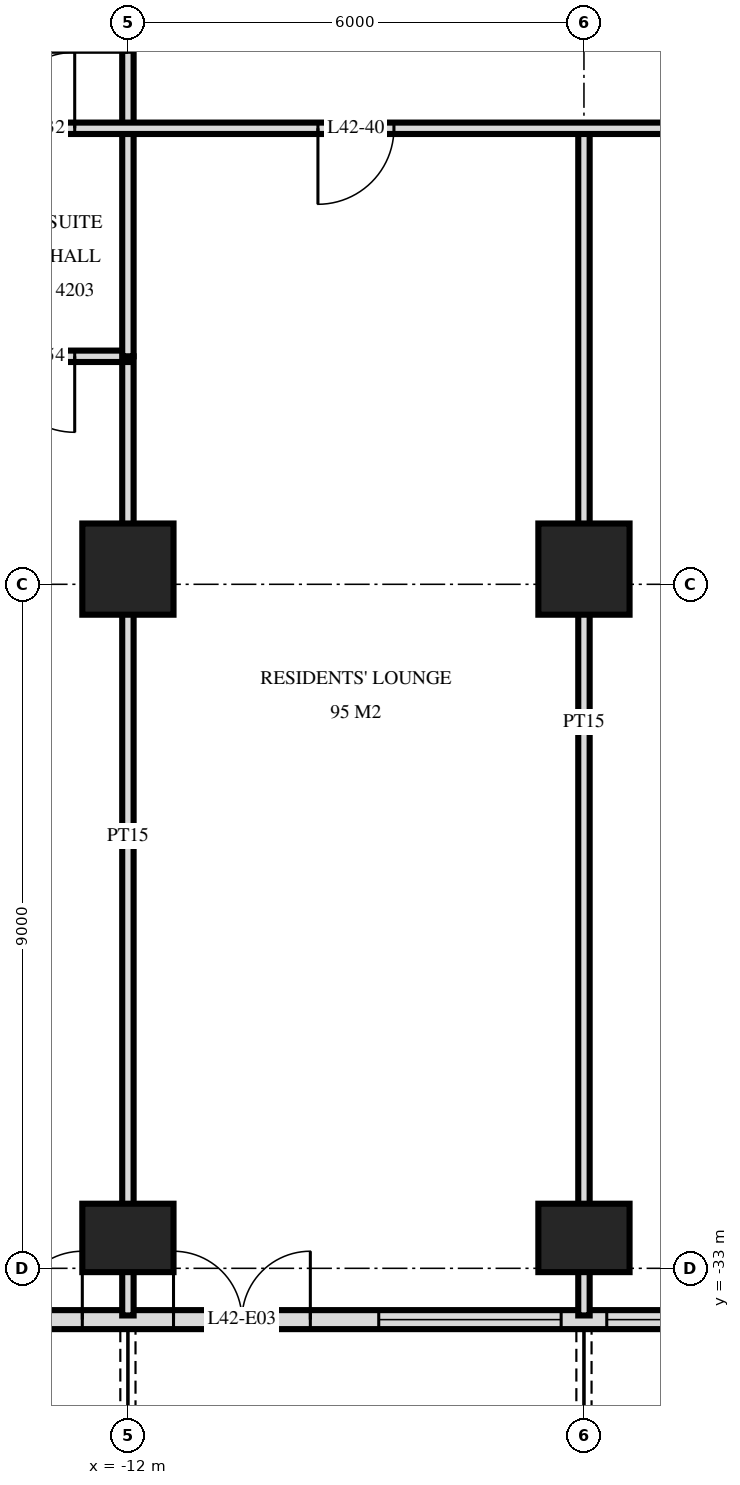
"""IFC4 building model, lengths in metres.
Left out: names, types, materials, properties, quantities, classifications, styles, units other than length and angle.
Written with IfcOpenShell. Run it as: python <this file> out.ifc"""

import sys

from ifc_helpers import new_model, si_unit, direction, frame, frame_2d, origin, origin_2d, place, context, subcontext, project, spatial, rectangle, extrude, element, fill, save


model = new_model("IFC4")
c1 = context("Model", 3, precision=1e-05, world=origin(), true_north=direction((0.0, 1.0)))
c2 = subcontext(c1, "Body", "Model", "MODEL_VIEW")
j1 = project(units=[si_unit("LENGTHUNIT", "METRE"), si_unit("PLANEANGLEUNIT", "RADIAN")], contexts=[c1])
p1 = place(None, origin())
s1 = spatial("IfcSite", under=j1, at=p1, CompositionType="ELEMENT")
p2 = place(p1, origin())
s2 = spatial("IfcBuilding", under=s1, at=p2, CompositionType="ELEMENT")
p3 = place(p2, frame((0.0, 0.0, 163.2)))
s3 = spatial("IfcBuildingStorey", under=s2, at=p3, CompositionType="ELEMENT", Elevation=163.2)
p4 = place(p3, frame((-12.0, -32.6, 0.0), z_axis=(0.0, 0.0, 1.0), x_axis=(1.0, 0.0, 0.0)))
e1 = element("IfcColumn", 1, at=p4, inside=s3, PredefinedType="COLUMN", context=c2, shape_type="SweptSolid", body=[
    extrude(rectangle(XDim=1.2, YDim=0.9, at=origin_2d()), origin(), (0.0, 0.0, 1.0), 3.6),
])
p5 = place(p3, frame((-12.0, -23.8, 0.0), z_axis=(0.0, 0.0, 1.0), x_axis=(1.0, 0.0, 0.0)))
e2 = element("IfcColumn", 2, at=p5, inside=s3, PredefinedType="COLUMN", context=c2, shape_type="SweptSolid", body=[
    extrude(rectangle(XDim=1.2, YDim=1.2, at=origin_2d()), origin(), (0.0, 0.0, 1.0), 3.6),
])
p6 = place(p3, frame((-6.0, -32.6, 0.0), z_axis=(0.0, 0.0, 1.0), x_axis=(1.0, 0.0, 0.0)))
e3 = element("IfcColumn", 3, at=p6, inside=s3, PredefinedType="COLUMN", context=c2, shape_type="SweptSolid", body=[
    extrude(rectangle(XDim=1.2, YDim=0.9, at=origin_2d()), origin(), (0.0, 0.0, 1.0), 3.6),
])
p7 = place(p3, frame((-6.0, -23.8, 0.0), z_axis=(0.0, 0.0, 1.0), x_axis=(1.0, 0.0, 0.0)))
e4 = element("IfcColumn", 4, at=p7, inside=s3, PredefinedType="COLUMN", context=c2, shape_type="SweptSolid", body=[
    extrude(rectangle(XDim=1.2, YDim=1.2, at=origin_2d()), origin(), (0.0, 0.0, 1.0), 3.6),
])
p8 = place(p3, frame((-23.675, -33.675, 0.0), z_axis=(0.0, 0.0, 1.0), x_axis=(1.0, 0.0, 0.0)))
e5 = element("IfcWall", 5, at=p8, inside=s3, PredefinedType="SOLIDWALL", context=c2, shape_type="SweptSolid", body=[
    extrude(rectangle(XDim=47.351, YDim=0.25, at=frame_2d((23.675, 0.0))), origin(), (0.0, 0.0, 1.0), 3.32),
])
p9 = place(p8, frame((0.575, 0.0, 0.0)))
e6 = element("IfcOpeningElement", 6, at=p9, cuts=e5, PredefinedType="OPENING", context=c2, shape_type="SweptSolid", body=[
    extrude(rectangle(XDim=1.8, YDim=2.4, at=frame_2d((0.9, 1.2))), frame((0.0, 0.135, 0.0), z_axis=(0.0, -1.0, 0.0), x_axis=(1.0, 0.0, 0.0)), (0.0, 0.0, 1.0), 0.27),
])
p10 = place(p8, frame((3.425, 0.0, 0.3)))
e7 = element("IfcOpeningElement", 7, at=p10, cuts=e5, PredefinedType="OPENING", context=c2, shape_type="SweptSolid", body=[
    extrude(rectangle(XDim=1.8, YDim=2.1, at=frame_2d((0.9, 1.05))), frame((0.0, 0.135, 0.0), z_axis=(0.0, -1.0, 0.0), x_axis=(1.0, 0.0, 0.0)), (0.0, 0.0, 1.0), 0.27),
])
p11 = place(p8, frame((5.975, 0.0, 0.3)))
e8 = element("IfcOpeningElement", 8, at=p11, cuts=e5, PredefinedType="OPENING", context=c2, shape_type="SweptSolid", body=[
    extrude(rectangle(XDim=2.4, YDim=2.1, at=frame_2d((1.2, 1.05))), frame((0.0, 0.135, 0.0), z_axis=(0.0, -1.0, 0.0), x_axis=(1.0, 0.0, 0.0)), (0.0, 0.0, 1.0), 0.27),
])
p12 = place(p8, frame((9.275, 0.0, 0.0)))
e9 = element("IfcOpeningElement", 9, at=p12, cuts=e5, PredefinedType="OPENING", context=c2, shape_type="SweptSolid", body=[
    extrude(rectangle(XDim=1.8, YDim=2.4, at=frame_2d((0.9, 1.2))), frame((0.0, 0.135, 0.0), z_axis=(0.0, -1.0, 0.0), x_axis=(1.0, 0.0, 0.0)), (0.0, 0.0, 1.0), 0.27),
])
p13 = place(p8, frame((12.275, 0.0, 0.0)))
e10 = element("IfcOpeningElement", 10, at=p13, cuts=e5, PredefinedType="OPENING", context=c2, shape_type="SweptSolid", body=[
    extrude(rectangle(XDim=1.8, YDim=2.4, at=frame_2d((0.9, 1.2))), frame((0.0, 0.135, 0.0), z_axis=(0.0, -1.0, 0.0), x_axis=(1.0, 0.0, 0.0)), (0.0, 0.0, 1.0), 0.27),
])
p14 = place(p8, frame((14.975, 0.0, 0.3)))
e11 = element("IfcOpeningElement", 11, at=p14, cuts=e5, PredefinedType="OPENING", context=c2, shape_type="SweptSolid", body=[
    extrude(rectangle(XDim=2.4, YDim=2.1, at=frame_2d((1.2, 1.05))), frame((0.0, 0.135, 0.0), z_axis=(0.0, -1.0, 0.0), x_axis=(1.0, 0.0, 0.0)), (0.0, 0.0, 1.0), 0.27),
])
p15 = place(p8, frame((17.975, 0.0, 0.3)))
e12 = element("IfcOpeningElement", 12, at=p15, cuts=e5, PredefinedType="OPENING", context=c2, shape_type="SweptSolid", body=[
    extrude(rectangle(XDim=2.4, YDim=2.1, at=frame_2d((1.2, 1.05))), frame((0.0, 0.135, 0.0), z_axis=(0.0, -1.0, 0.0), x_axis=(1.0, 0.0, 0.0)), (0.0, 0.0, 1.0), 0.27),
])
p16 = place(p8, frame((21.275, 0.0, 0.0)))
e13 = element("IfcOpeningElement", 13, at=p16, cuts=e5, PredefinedType="OPENING", context=c2, shape_type="SweptSolid", body=[
    extrude(rectangle(XDim=1.8, YDim=2.4, at=frame_2d((0.9, 1.2))), frame((0.0, 0.135, 0.0), z_axis=(0.0, -1.0, 0.0), x_axis=(1.0, 0.0, 0.0)), (0.0, 0.0, 1.0), 0.27),
])
p17 = place(p8, frame((24.275, 0.0, 0.0)))
e14 = element("IfcOpeningElement", 14, at=p17, cuts=e5, PredefinedType="OPENING", context=c2, shape_type="SweptSolid", body=[
    extrude(rectangle(XDim=1.8, YDim=2.4, at=frame_2d((0.9, 1.2))), frame((0.0, 0.135, 0.0), z_axis=(0.0, -1.0, 0.0), x_axis=(1.0, 0.0, 0.0)), (0.0, 0.0, 1.0), 0.27),
])
p18 = place(p8, frame((26.975, 0.0, 0.3)))
e15 = element("IfcOpeningElement", 15, at=p18, cuts=e5, PredefinedType="OPENING", context=c2, shape_type="SweptSolid", body=[
    extrude(rectangle(XDim=2.4, YDim=2.1, at=frame_2d((1.2, 1.05))), frame((0.0, 0.135, 0.0), z_axis=(0.0, -1.0, 0.0), x_axis=(1.0, 0.0, 0.0)), (0.0, 0.0, 1.0), 0.27),
])
p19 = place(p8, frame((30.275, 0.0, 0.0)))
e16 = element("IfcOpeningElement", 16, at=p19, cuts=e5, PredefinedType="OPENING", context=c2, shape_type="SweptSolid", body=[
    extrude(rectangle(XDim=1.8, YDim=2.4, at=frame_2d((0.9, 1.2))), frame((0.0, 0.135, 0.0), z_axis=(0.0, -1.0, 0.0), x_axis=(1.0, 0.0, 0.0)), (0.0, 0.0, 1.0), 0.27),
])
p20 = place(p8, frame((32.975, 0.0, 0.3)))
e17 = element("IfcOpeningElement", 17, at=p20, cuts=e5, PredefinedType="OPENING", context=c2, shape_type="SweptSolid", body=[
    extrude(rectangle(XDim=2.4, YDim=2.1, at=frame_2d((1.2, 1.05))), frame((0.0, 0.135, 0.0), z_axis=(0.0, -1.0, 0.0), x_axis=(1.0, 0.0, 0.0)), (0.0, 0.0, 1.0), 0.27),
])
p21 = place(p8, frame((36.275, 0.0, 0.0)))
e18 = element("IfcOpeningElement", 18, at=p21, cuts=e5, PredefinedType="OPENING", context=c2, shape_type="SweptSolid", body=[
    extrude(rectangle(XDim=1.8, YDim=2.4, at=frame_2d((0.9, 1.2))), frame((0.0, 0.135, 0.0), z_axis=(0.0, -1.0, 0.0), x_axis=(1.0, 0.0, 0.0)), (0.0, 0.0, 1.0), 0.27),
])
p22 = place(p8, frame((38.975, 0.0, 0.3)))
e19 = element("IfcOpeningElement", 19, at=p22, cuts=e5, PredefinedType="OPENING", context=c2, shape_type="SweptSolid", body=[
    extrude(rectangle(XDim=2.4, YDim=2.1, at=frame_2d((1.2, 1.05))), frame((0.0, 0.135, 0.0), z_axis=(0.0, -1.0, 0.0), x_axis=(1.0, 0.0, 0.0)), (0.0, 0.0, 1.0), 0.27),
])
p23 = place(p8, frame((41.975, 0.0, 0.3)))
e20 = element("IfcOpeningElement", 20, at=p23, cuts=e5, PredefinedType="OPENING", context=c2, shape_type="SweptSolid", body=[
    extrude(rectangle(XDim=2.4, YDim=2.1, at=frame_2d((1.2, 1.05))), frame((0.0, 0.135, 0.0), z_axis=(0.0, -1.0, 0.0), x_axis=(1.0, 0.0, 0.0)), (0.0, 0.0, 1.0), 0.27),
])
p24 = place(p8, frame((45.125, 0.0, 0.0)))
e21 = element("IfcOpeningElement", 21, at=p24, cuts=e5, PredefinedType="OPENING", context=c2, shape_type="SweptSolid", body=[
    extrude(rectangle(XDim=1.8, YDim=2.4, at=frame_2d((0.9, 1.2))), frame((0.0, 0.135, 0.0), z_axis=(0.0, -1.0, 0.0), x_axis=(1.0, 0.0, 0.0)), (0.0, 0.0, 1.0), 0.27),
])
p25 = place(p3, frame((-6.0, -33.62, 0.0), z_axis=(0.0, 0.0, 1.0), x_axis=(0.0, 1.0, 0.0)))
e22 = element("IfcWall", 22, at=p25, inside=s3, PredefinedType="PARTITIONING", context=c2, shape_type="SweptSolid", body=[
    extrude(rectangle(XDim=15.62, YDim=0.15, at=frame_2d((7.81, 0.0))), origin(), (0.0, 0.0, 1.0), 3.32),
])
p26 = place(p3, frame((-12.0, -21.0, 0.0), z_axis=(0.0, 0.0, 1.0), x_axis=(0.0, 1.0, 0.0)))
e23 = element("IfcWall", 23, at=p26, inside=s3, PredefinedType="PARTITIONING", context=c2, shape_type="SweptSolid", body=[
    extrude(rectangle(XDim=5.95, YDim=0.15, at=frame_2d((2.975, 0.0))), origin(), (0.0, 0.0, 1.0), 3.32),
])
p27 = place(p26, frame((4.0, 0.0, 0.0)))
e24 = element("IfcOpeningElement", 24, at=p27, cuts=e23, PredefinedType="OPENING", context=c2, shape_type="SweptSolid", body=[
    extrude(rectangle(XDim=1.0, YDim=2.1, at=frame_2d((0.5, 1.05))), frame((0.0, 0.085, 0.0), z_axis=(0.0, -1.0, 0.0), x_axis=(1.0, 0.0, 0.0)), (0.0, 0.0, 1.0), 0.17),
])
p28 = place(p3, frame((-12.0, -33.62, 0.0), z_axis=(0.0, 0.0, 1.0), x_axis=(0.0, 1.0, 0.0)))
e25 = element("IfcWall", 25, at=p28, inside=s3, PredefinedType="PARTITIONING", context=c2, shape_type="SweptSolid", body=[
    extrude(rectangle(XDim=12.62, YDim=0.15, at=frame_2d((6.31, 0.0))), origin(), (0.0, 0.0, 1.0), 3.32),
])
p29 = place(p3, frame((-14.4, -21.0, 0.0), z_axis=(0.0, 0.0, 1.0), x_axis=(1.0, 0.0, 0.0)))
e26 = element("IfcWall", 26, at=p29, inside=s3, PredefinedType="PARTITIONING", context=c2, shape_type="SweptSolid", body=[
    extrude(rectangle(XDim=2.4, YDim=0.15, at=frame_2d((1.2, 0.0))), origin(), (0.0, 0.0, 1.0), 3.32),
])
p30 = place(p29, frame((0.7, 0.0, 0.0)))
e27 = element("IfcOpeningElement", 27, at=p30, cuts=e26, PredefinedType="OPENING", context=c2, shape_type="SweptSolid", body=[
    extrude(rectangle(XDim=1.0, YDim=2.1, at=frame_2d((0.5, 1.05))), frame((0.0, 0.085, 0.0), z_axis=(0.0, -1.0, 0.0), x_axis=(1.0, 0.0, 0.0)), (0.0, 0.0, 1.0), 0.17),
])
p31 = place(p3, frame((-28.02, -18.0, 0.0), z_axis=(0.0, 0.0, 1.0), x_axis=(1.0, 0.0, 0.0)))
e28 = element("IfcWall", 28, at=p31, inside=s3, PredefinedType="PARTITIONING", context=c2, shape_type="SweptSolid", body=[
    extrude(rectangle(XDim=56.04, YDim=0.15, at=frame_2d((28.02, 0.0))), origin(), (0.0, 0.0, 1.0), 3.32),
])
p32 = place(p31, frame((14.32, 0.0, 0.0)))
e29 = element("IfcOpeningElement", 29, at=p32, cuts=e28, PredefinedType="OPENING", context=c2, shape_type="SweptSolid", body=[
    extrude(rectangle(XDim=1.0, YDim=2.1, at=frame_2d((0.5, 1.05))), frame((0.0, 0.085, 0.0), z_axis=(0.0, -1.0, 0.0), x_axis=(1.0, 0.0, 0.0)), (0.0, 0.0, 1.0), 0.17),
])
p33 = place(p31, frame((40.17, 0.0, 0.0)))
e30 = element("IfcOpeningElement", 30, at=p33, cuts=e28, PredefinedType="OPENING", context=c2, shape_type="SweptSolid", body=[
    extrude(rectangle(XDim=1.0, YDim=2.1, at=frame_2d((0.5, 1.05))), frame((0.0, 0.085, 0.0), z_axis=(0.0, -1.0, 0.0), x_axis=(1.0, 0.0, 0.0)), (0.0, 0.0, 1.0), 0.17),
])
p34 = place(p31, frame((44.87, 0.0, 0.0)))
e31 = element("IfcOpeningElement", 31, at=p34, cuts=e28, PredefinedType="OPENING", context=c2, shape_type="SweptSolid", body=[
    extrude(rectangle(XDim=1.0, YDim=2.1, at=frame_2d((0.5, 1.05))), frame((0.0, 0.085, 0.0), z_axis=(0.0, -1.0, 0.0), x_axis=(1.0, 0.0, 0.0)), (0.0, 0.0, 1.0), 0.17),
])
p35 = place(p31, frame((46.72, 0.0, 0.0)))
e32 = element("IfcOpeningElement", 32, at=p35, cuts=e28, PredefinedType="OPENING", context=c2, shape_type="SweptSolid", body=[
    extrude(rectangle(XDim=1.0, YDim=2.1, at=frame_2d((0.5, 1.05))), frame((0.0, 0.085, 0.0), z_axis=(0.0, -1.0, 0.0), x_axis=(1.0, 0.0, 0.0)), (0.0, 0.0, 1.0), 0.17),
])
p36 = place(p31, frame((18.52, 0.0, 0.0)))
e33 = element("IfcOpeningElement", 33, at=p36, cuts=e28, PredefinedType="OPENING", context=c2, shape_type="SweptSolid", body=[
    extrude(rectangle(XDim=1.0, YDim=2.1, at=frame_2d((0.5, 1.05))), frame((0.0, 0.085, 0.0), z_axis=(0.0, -1.0, 0.0), x_axis=(1.0, 0.0, 0.0)), (0.0, 0.0, 1.0), 0.17),
])
p37 = place(p31, frame((24.52, 0.0, 0.0)))
e34 = element("IfcOpeningElement", 34, at=p37, cuts=e28, PredefinedType="OPENING", context=c2, shape_type="SweptSolid", body=[
    extrude(rectangle(XDim=1.0, YDim=2.1, at=frame_2d((0.5, 1.05))), frame((0.0, 0.085, 0.0), z_axis=(0.0, -1.0, 0.0), x_axis=(1.0, 0.0, 0.0)), (0.0, 0.0, 1.0), 0.17),
])
p38 = place(p31, frame((30.52, 0.0, 0.0)))
e35 = element("IfcOpeningElement", 35, at=p38, cuts=e28, PredefinedType="OPENING", context=c2, shape_type="SweptSolid", body=[
    extrude(rectangle(XDim=1.0, YDim=2.1, at=frame_2d((0.5, 1.05))), frame((0.0, 0.085, 0.0), z_axis=(0.0, -1.0, 0.0), x_axis=(1.0, 0.0, 0.0)), (0.0, 0.0, 1.0), 0.17),
])
p39 = place(p31, frame((36.52, 0.0, 0.0)))
e36 = element("IfcOpeningElement", 36, at=p39, cuts=e28, PredefinedType="OPENING", context=c2, shape_type="SweptSolid", body=[
    extrude(rectangle(XDim=1.0, YDim=2.1, at=frame_2d((0.5, 1.05))), frame((0.0, 0.085, 0.0), z_axis=(0.0, -1.0, 0.0), x_axis=(1.0, 0.0, 0.0)), (0.0, 0.0, 1.0), 0.17),
])
p40 = place(p12, origin())
e37 = element("IfcDoor", 37, at=p40, inside=s3, OperationType="DOUBLE_DOOR_SINGLE_SWING", PredefinedType="DOOR", context=c2, shape_type="SweptSolid", body=[
    extrude(rectangle(XDim=1.8, YDim=2.4, at=frame_2d((0.9, 1.2))), frame((0.0, 0.025, 0.0), z_axis=(0.0, -1.0, 0.0), x_axis=(1.0, 0.0, 0.0)), (0.0, 0.0, 1.0), 0.05),
])
fill(e9, e37)
p41 = place(p13, origin())
e38 = element("IfcDoor", 38, at=p41, inside=s3, OperationType="DOUBLE_DOOR_SINGLE_SWING", PredefinedType="DOOR", context=c2, shape_type="SweptSolid", body=[
    extrude(rectangle(XDim=1.8, YDim=2.4, at=frame_2d((0.9, 1.2))), frame((0.0, 0.025, 0.0), z_axis=(0.0, -1.0, 0.0), x_axis=(1.0, 0.0, 0.0)), (0.0, 0.0, 1.0), 0.05),
])
fill(e10, e38)
p42 = place(p14, origin())
e39 = element("IfcWindow", 39, at=p42, inside=s3, PartitioningType="SINGLE_PANEL", PredefinedType="WINDOW", context=c2, shape_type="SweptSolid", body=[
    extrude(rectangle(XDim=2.4, YDim=2.1, at=frame_2d((1.2, 1.05))), frame((0.0, 0.03, 0.0), z_axis=(0.0, -1.0, 0.0), x_axis=(1.0, 0.0, 0.0)), (0.0, 0.0, 1.0), 0.06),
])
fill(e11, e39)
p43 = place(p15, origin())
e40 = element("IfcWindow", 40, at=p43, inside=s3, PartitioningType="SINGLE_PANEL", PredefinedType="WINDOW", context=c2, shape_type="SweptSolid", body=[
    extrude(rectangle(XDim=2.4, YDim=2.1, at=frame_2d((1.2, 1.05))), frame((0.0, 0.03, 0.0), z_axis=(0.0, -1.0, 0.0), x_axis=(1.0, 0.0, 0.0)), (0.0, 0.0, 1.0), 0.06),
])
fill(e12, e40)
p44 = place(p32, origin())
e41 = element("IfcDoor", 41, at=p44, inside=s3, OperationType="SINGLE_SWING_LEFT", PredefinedType="DOOR", context=c2, shape_type="SweptSolid", body=[
    extrude(rectangle(XDim=1.0, YDim=2.1, at=frame_2d((0.5, 1.05))), frame((0.0, 0.025, 0.0), z_axis=(0.0, -1.0, 0.0), x_axis=(1.0, 0.0, 0.0)), (0.0, 0.0, 1.0), 0.05),
])
fill(e29, e41)
p45 = place(p36, frame((0.5, 0.0, 0.0), z_axis=(0.0, 0.0, 1.0), x_axis=(-1.0, 0.0, 0.0)))
e42 = element("IfcDoor", 42, at=p45, inside=s3, OperationType="SINGLE_SWING_LEFT", PredefinedType="DOOR", context=c2, shape_type="SweptSolid", body=[
    extrude(rectangle(XDim=1.0, YDim=2.1, at=frame_2d((0.0, 1.05))), frame((0.0, -0.025, 0.0), z_axis=(0.0, 1.0, 0.0), x_axis=(-1.0, 0.0, 0.0)), (0.0, 0.0, 1.0), 0.05),
])
fill(e33, e42)
p46 = place(p30, frame((0.5, 0.0, 0.0), z_axis=(0.0, 0.0, 1.0), x_axis=(-1.0, 0.0, 0.0)))
e43 = element("IfcDoor", 43, at=p46, inside=s3, OperationType="SINGLE_SWING_RIGHT", PredefinedType="DOOR", context=c2, shape_type="SweptSolid", body=[
    extrude(rectangle(XDim=1.0, YDim=2.1, at=frame_2d((0.0, 1.05))), frame((0.0, -0.025, 0.0), z_axis=(0.0, 1.0, 0.0), x_axis=(-1.0, 0.0, 0.0)), (0.0, 0.0, 1.0), 0.05),
])
fill(e27, e43)
save(model, sys.argv[1])
